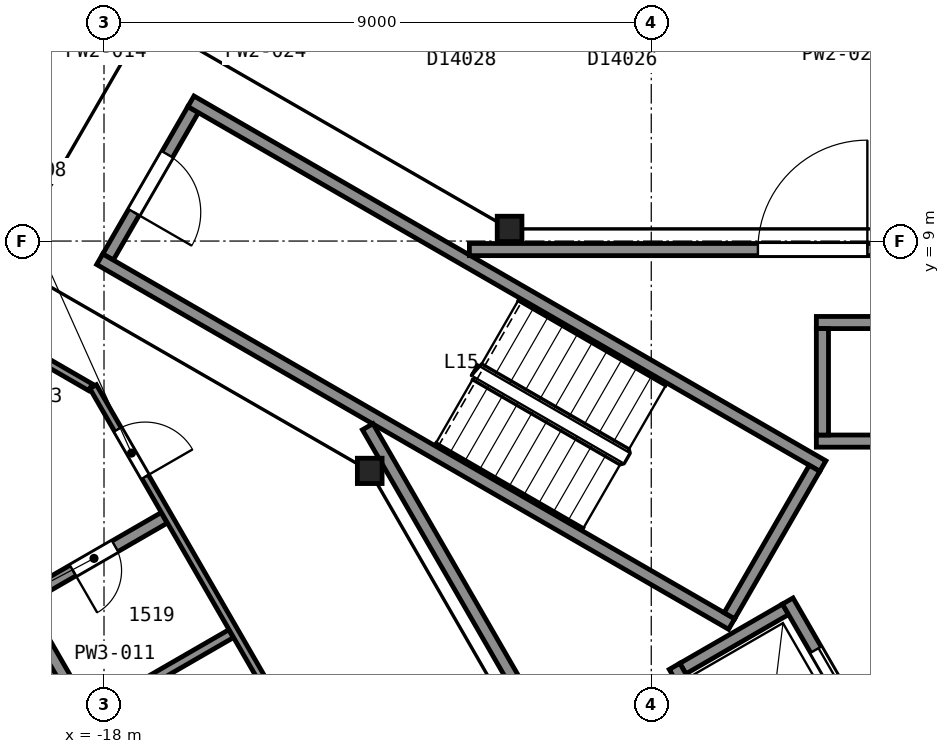
"""IFC4 building model, lengths in metres.
Left out: names, types, materials, properties, quantities, classifications, styles, units other than length and angle.
Written with IfcOpenShell. Run it as: python <this file> out.ifc"""

import sys

from ifc_helpers import new_model, si_unit, direction, frame, frame_2d, origin, origin_2d, place, context, subcontext, project, spatial, rectangle, i_section, extrude, element, fill, save


model = new_model("IFC4")
c1 = context("Model", 3, precision=1e-05, world=origin(), true_north=direction((0.0, 1.0)))
c2 = subcontext(c1, "Body", "Model", "MODEL_VIEW")
j1 = project(units=[si_unit("LENGTHUNIT", "METRE"), si_unit("PLANEANGLEUNIT", "RADIAN")], contexts=[c1])
p1 = place(None, origin())
s1 = spatial("IfcSite", under=j1, at=p1, CompositionType="ELEMENT")
p2 = place(p1, origin())
s2 = spatial("IfcBuilding", under=s1, at=p2, CompositionType="ELEMENT")
p3 = place(p2, frame((0.0, 0.0, 69.2)))
s3 = spatial("IfcBuildingStorey", under=s2, at=p3, CompositionType="ELEMENT", Elevation=69.2)
for number, where, z_axis, x_axis in (
    (1, (-11.33, 9.2, 0.0), (0.0, 0.0, 1.0), (1.0, 0.0, 0.0)),
    (2, (-13.63, 5.22, 0.0), (0.0, 0.0, 1.0), (1.0, 0.0, 0.0)),
):
    element("IfcColumn", number, at=place(p3, frame(where, z_axis=z_axis, x_axis=x_axis)), inside=s3, PredefinedType="COLUMN", context=c2, shape_type="SweptSolid", body=[
        extrude(i_section(OverallWidth=0.406, OverallDepth=0.417, WebThickness=0.03, FlangeThickness=0.048, FilletRadius=0.015, at=origin_2d()), origin(), (0.0, 0.0, 1.0), 3.6),
    ])
p4 = place(p3, frame((-16.534, 11.162, 0.0), z_axis=(0.0, 0.0, 1.0), x_axis=(-0.49998411664, -0.866034573852, 0.0)))
e3 = element("IfcWall", 3, at=p4, inside=s3, PredefinedType="PARTITIONING", context=c2, shape_type="SweptSolid", body=[
    extrude(rectangle(XDim=2.8, YDim=0.2, at=frame_2d((1.4, 0.0))), origin(), (0.0, 0.0, 1.0), 3.35),
])
p5 = place(p4, frame((0.85, 0.0, 0.0)))
e4 = element("IfcOpeningElement", 4, at=p5, cuts=e3, PredefinedType="OPENING", context=c2, shape_type="SweptSolid", body=[
    extrude(rectangle(XDim=1.1, YDim=2.1, at=frame_2d((0.55, 1.05))), frame((0.0, 0.11, 0.0), z_axis=(0.0, -1.0, 0.0), x_axis=(1.0, 0.0, 0.0)), (0.0, 0.0, 1.0), 0.22),
])
for number, where, z_axis, x_axis in (
    (5, (-7.678, 2.701, 0.0), (0.0, 0.0, 1.0), (-0.866, 0.5, 0.0)),
    (6, (-6.178, 5.299, 0.0), (0.0, 0.0, 1.0), (-0.866, 0.5, 0.0)),
):
    element("IfcWall", number, at=place(p3, frame(where, z_axis=z_axis, x_axis=x_axis)), inside=s3, PredefinedType="PARTITIONING", context=c2, shape_type="SweptSolid", body=[
        extrude(rectangle(XDim=12.0, YDim=0.2, at=frame_2d((6.0, 0.0))), origin(), (0.0, 0.0, 1.0), 3.35),
    ])
p6 = place(p3, frame((-6.315, 5.262, 0.0), z_axis=(0.0, 0.0, 1.0), x_axis=(-0.500049511043, -0.865996816683, 0.0)))
e7 = element("IfcWall", 7, at=p6, inside=s3, PredefinedType="PARTITIONING", context=c2, shape_type="SweptSolid", body=[
    extrude(rectangle(XDim=2.8, YDim=0.2, at=frame_2d((1.4, 0.0))), origin(), (0.0, 0.0, 1.0), 3.35),
])
for number, where, z_axis, x_axis in (
    (8, (-6.285, 5.71, 0.0), (0.0, 0.0, 1.0), (1.0, 0.0, 0.0)),
    (9, (-6.285, 7.66, 0.0), (0.0, 0.0, 1.0), (1.0, 0.0, 0.0)),
):
    element("IfcWall", number, at=place(p3, frame(where, z_axis=z_axis, x_axis=x_axis)), inside=s3, PredefinedType="PARTITIONING", context=c2, shape_type="SweptSolid", body=[
        extrude(rectangle(XDim=2.35, YDim=0.2, at=frame_2d((1.175, 0.0))), origin(), (0.0, 0.0, 1.0), 3.6),
    ])
p7 = place(p3, frame((-8.48, 1.969, 0.0), z_axis=(0.0, 0.0, 1.0), x_axis=(0.866000020948, 0.500043961785, 0.0)))
e10 = element("IfcWall", 10, at=p7, inside=s3, PredefinedType="PARTITIONING", context=c2, shape_type="SweptSolid", body=[
    extrude(rectangle(XDim=1.95, YDim=0.2, at=frame_2d((0.975, 0.0))), origin(), (0.0, 0.0, 1.0), 3.6),
])
p8 = place(p3, frame((-6.185, 5.81, 0.0), z_axis=(0.0, 0.0, 1.0), x_axis=(0.0, 1.0, 0.0)))
e11 = element("IfcWall", 11, at=p8, inside=s3, PredefinedType="PARTITIONING", context=c2, shape_type="SweptSolid", body=[
    extrude(rectangle(XDim=1.75, YDim=0.2, at=frame_2d((0.875, 0.0))), origin(), (0.0, 0.0, 1.0), 3.6),
])
p9 = place(p3, frame((-5.28, 0.525, 0.0), z_axis=(0.0, 0.0, 1.0), x_axis=(-0.500037662692, 0.866003658127, 0.0)))
e12 = element("IfcWall", 12, at=p9, inside=s3, PredefinedType="PARTITIONING", context=c2, shape_type="SweptSolid", body=[
    extrude(rectangle(XDim=2.95, YDim=0.2, at=frame_2d((1.475, 0.0))), origin(), (0.0, 0.0, 1.0), 3.6),
])
p10 = place(p9, frame((0.925, 0.0, 0.0)))
e13 = element("IfcOpeningElement", 13, at=p10, cuts=e12, PredefinedType="OPENING", context=c2, shape_type="SweptSolid", body=[
    extrude(rectangle(XDim=1.1, YDim=2.1, at=frame_2d((0.55, 1.05))), frame((0.0, 0.11, 0.0), z_axis=(0.0, -1.0, 0.0), x_axis=(1.0, 0.0, 0.0)), (0.0, 0.0, 1.0), 0.22),
])
p11 = place(p3, frame((-7.242, -0.376, 0.0), z_axis=(0.0, 0.0, 1.0), x_axis=(-0.499996545922, 0.866027397988, 0.0)))
e14 = element("IfcWall", 14, at=p11, inside=s3, PredefinedType="PARTITIONING", context=c2, shape_type="SweptSolid", body=[
    extrude(rectangle(XDim=2.75, YDim=0.2, at=frame_2d((1.375, 0.0))), origin(), (0.0, 0.0, 1.0), 3.6),
])
p12 = place(p3, frame((-13.664, 5.946, 0.0), z_axis=(0.0, 0.0, 1.0), x_axis=(0.499994327219, -0.866028678941, 0.0)))
e15 = element("IfcWall", 15, at=p12, inside=s3, PredefinedType="PARTITIONING", context=c2, shape_type="SweptSolid", body=[
    extrude(rectangle(XDim=23.968, YDim=0.2, at=frame_2d((11.984, 0.0))), origin(), (0.0, 0.0, 1.0), 3.35),
])
p13 = place(p3, frame((0.263, 8.86, 0.0), z_axis=(0.0, 0.0, 1.0), x_axis=(-1.0, 0.0, 0.0)))
e16 = element("IfcWall", 16, at=p13, inside=s3, PredefinedType="PARTITIONING", context=c2, shape_type="SweptSolid", body=[
    extrude(rectangle(XDim=12.254, YDim=0.2, at=frame_2d((6.127, 0.0))), origin(), (0.0, 0.0, 1.0), 3.35),
])
p14 = place(p13, frame((5.709, 0.0, 0.0)))
e17 = element("IfcOpeningElement", 17, at=p14, cuts=e16, PredefinedType="OPENING", context=c2, shape_type="SweptSolid", body=[
    extrude(rectangle(XDim=1.8, YDim=2.1, at=frame_2d((0.9, 1.05))), frame((0.0, 0.11, 0.0), z_axis=(0.0, -1.0, 0.0), x_axis=(1.0, 0.0, 0.0)), (0.0, 0.0, 1.0), 0.22),
])
p15 = place(p3, frame((-23.26, -1.701, 0.0), z_axis=(0.0, 0.0, 1.0), x_axis=(0.866027021296, 0.499997198377, 0.0)))
e18 = element("IfcWall", 18, at=p15, inside=s3, PredefinedType="PARTITIONING", context=c2, shape_type="SweptSolid", body=[
    extrude(rectangle(XDim=8.487, YDim=0.15, at=frame_2d((4.243, 0.0))), origin(), (0.0, 0.0, 1.0), 2.613),
])
p16 = place(p3, frame((-19.327, 2.994, 0.0), z_axis=(0.0, 0.0, 1.0), x_axis=(0.500042536776, -0.866000843773, 0.0)))
e19 = element("IfcWall", 19, at=p16, inside=s3, PredefinedType="PARTITIONING", context=c2, shape_type="SweptSolid", body=[
    extrude(rectangle(XDim=2.025, YDim=0.2, at=frame_2d((1.012, 0.0))), origin(), (0.0, 0.0, 1.0), 2.613),
])
p17 = place(p3, frame((-17.01, 4.447, 0.0), z_axis=(0.0, 0.0, 1.0), x_axis=(-0.866033446572, -0.499986069224, 0.0)))
e20 = element("IfcWall", 20, at=p17, inside=s3, PredefinedType="PARTITIONING", context=c2, shape_type="SweptSolid", body=[
    extrude(rectangle(XDim=2.833, YDim=0.2, at=frame_2d((1.416, 0.0))), origin(), (0.0, 0.0, 1.0), 2.613),
])
p18 = place(p17, frame((0.933, 0.0, 0.0)))
e21 = element("IfcOpeningElement", 21, at=p18, cuts=e20, PredefinedType="OPENING", context=c2, shape_type="SweptSolid", body=[
    extrude(rectangle(XDim=0.8, YDim=2.1, at=frame_2d((0.4, 1.05))), frame((0.0, 0.11, 0.0), z_axis=(0.0, -1.0, 0.0), x_axis=(1.0, 0.0, 0.0)), (0.0, 0.0, 1.0), 0.22),
])
p19 = place(p3, frame((-19.132, 7.121, 0.0), z_axis=(0.0, 0.0, 1.0), x_axis=(0.865876245925, -0.500258260045, 0.0)))
e22 = element("IfcWall", 22, at=p19, inside=s3, PredefinedType="PARTITIONING", context=c2, shape_type="SweptSolid", body=[
    extrude(rectangle(XDim=1.052, YDim=0.125, at=frame_2d((0.526, 0.0))), origin(), (0.0, 0.0, 1.0), 2.613),
])
p20 = place(p3, frame((-3.766, -18.358, 0.0), z_axis=(0.0, 0.0, 1.0), x_axis=(-0.500003973642, 0.866023109589, 0.0)))
e23 = element("IfcWall", 23, at=p20, inside=s3, PredefinedType="PARTITIONING", context=c2, shape_type="SweptSolid", body=[
    extrude(rectangle(XDim=28.826, YDim=0.125, at=frame_2d((14.413, 0.0))), origin(), (0.0, 0.0, 1.0), 2.613),
])
p21 = place(p20, frame((27.114, 0.0, 0.0)))
e24 = element("IfcOpeningElement", 24, at=p21, cuts=e23, PredefinedType="OPENING", context=c2, shape_type="SweptSolid", body=[
    extrude(rectangle(XDim=0.9, YDim=2.1, at=frame_2d((0.45, 1.05))), frame((0.0, 0.073, 0.0), z_axis=(0.0, -1.0, 0.0), x_axis=(1.0, 0.0, 0.0)), (0.0, 0.0, 1.0), 0.145),
])
p22 = place(p20, frame((20.322, 0.0, 0.0)))
e25 = element("IfcOpeningElement", 25, at=p22, cuts=e23, PredefinedType="OPENING", context=c2, shape_type="SweptSolid", body=[
    extrude(rectangle(XDim=0.9, YDim=2.1, at=frame_2d((0.45, 1.05))), frame((0.0, 0.073, 0.0), z_axis=(0.0, -1.0, 0.0), x_axis=(1.0, 0.0, 0.0)), (0.0, 0.0, 1.0), 0.145),
])
p23 = place(p20, frame((17.68, 0.0, 0.0)))
e26 = element("IfcOpeningElement", 26, at=p23, cuts=e23, PredefinedType="OPENING", context=c2, shape_type="SweptSolid", body=[
    extrude(rectangle(XDim=0.9, YDim=2.1, at=frame_2d((0.45, 1.05))), frame((0.0, 0.073, 0.0), z_axis=(0.0, -1.0, 0.0), x_axis=(1.0, 0.0, 0.0)), (0.0, 0.0, 1.0), 0.145),
])
p24 = place(p20, frame((10.836, 0.0, 0.0)))
e27 = element("IfcOpeningElement", 27, at=p24, cuts=e23, PredefinedType="OPENING", context=c2, shape_type="SweptSolid", body=[
    extrude(rectangle(XDim=0.9, YDim=2.1, at=frame_2d((0.45, 1.05))), frame((0.0, 0.073, 0.0), z_axis=(0.0, -1.0, 0.0), x_axis=(1.0, 0.0, 0.0)), (0.0, 0.0, 1.0), 0.145),
])
p25 = place(p20, frame((7.342, 0.0, 0.0)))
e28 = element("IfcOpeningElement", 28, at=p25, cuts=e23, PredefinedType="OPENING", context=c2, shape_type="SweptSolid", body=[
    extrude(rectangle(XDim=0.9, YDim=2.1, at=frame_2d((0.45, 1.05))), frame((0.0, 0.073, 0.0), z_axis=(0.0, -1.0, 0.0), x_axis=(1.0, 0.0, 0.0)), (0.0, 0.0, 1.0), 0.145),
])
p26 = place(p5, origin())
e29 = element("IfcDoor", 29, at=p26, inside=s3, OperationType="SINGLE_SWING_RIGHT", PredefinedType="DOOR", context=c2, shape_type="SweptSolid", body=[
    extrude(rectangle(XDim=1.1, YDim=2.1, at=frame_2d((0.55, 1.05))), frame((0.0, 0.025, 0.0), z_axis=(0.0, -1.0, 0.0), x_axis=(1.0, 0.0, 0.0)), (0.0, 0.0, 1.0), 0.05),
])
fill(e4, e29)
p27 = place(p10, origin())
e30 = element("IfcDoor", 30, at=p27, inside=s3, OperationType="SLIDING_TO_LEFT", PredefinedType="DOOR", context=c2, shape_type="SweptSolid", body=[
    extrude(rectangle(XDim=1.1, YDim=2.1, at=frame_2d((0.55, 1.05))), frame((0.0, 0.025, 0.0), z_axis=(0.0, -1.0, 0.0), x_axis=(1.0, 0.0, 0.0)), (0.0, 0.0, 1.0), 0.05),
])
fill(e13, e30)
p28 = place(p14, origin())
e31 = element("IfcDoor", 31, at=p28, inside=s3, OperationType="DOUBLE_DOOR_SINGLE_SWING", PredefinedType="DOOR", context=c2, shape_type="SweptSolid", body=[
    extrude(rectangle(XDim=1.8, YDim=2.1, at=frame_2d((0.9, 1.05))), frame((0.0, 0.025, 0.0), z_axis=(0.0, -1.0, 0.0), x_axis=(1.0, 0.0, 0.0)), (0.0, 0.0, 1.0), 0.05),
])
fill(e17, e31)
p29 = place(p18, origin())
e32 = element("IfcDoor", 32, at=p29, inside=s3, OperationType="SINGLE_SWING_RIGHT", PredefinedType="DOOR", context=c2, shape_type="SweptSolid", body=[
    extrude(rectangle(XDim=0.8, YDim=2.1, at=frame_2d((0.4, 1.05))), frame((0.0, 0.025, 0.0), z_axis=(0.0, -1.0, 0.0), x_axis=(1.0, 0.0, 0.0)), (0.0, 0.0, 1.0), 0.05),
])
fill(e21, e32)
p30 = place(p21, origin())
e33 = element("IfcDoor", 33, at=p30, inside=s3, OperationType="SINGLE_SWING_LEFT", PredefinedType="DOOR", context=c2, shape_type="SweptSolid", body=[
    extrude(rectangle(XDim=0.9, YDim=2.1, at=frame_2d((0.45, 1.05))), frame((0.0, 0.025, 0.0), z_axis=(0.0, -1.0, 0.0), x_axis=(1.0, 0.0, 0.0)), (0.0, 0.0, 1.0), 0.05),
])
fill(e24, e33)
save(model, sys.argv[1])
